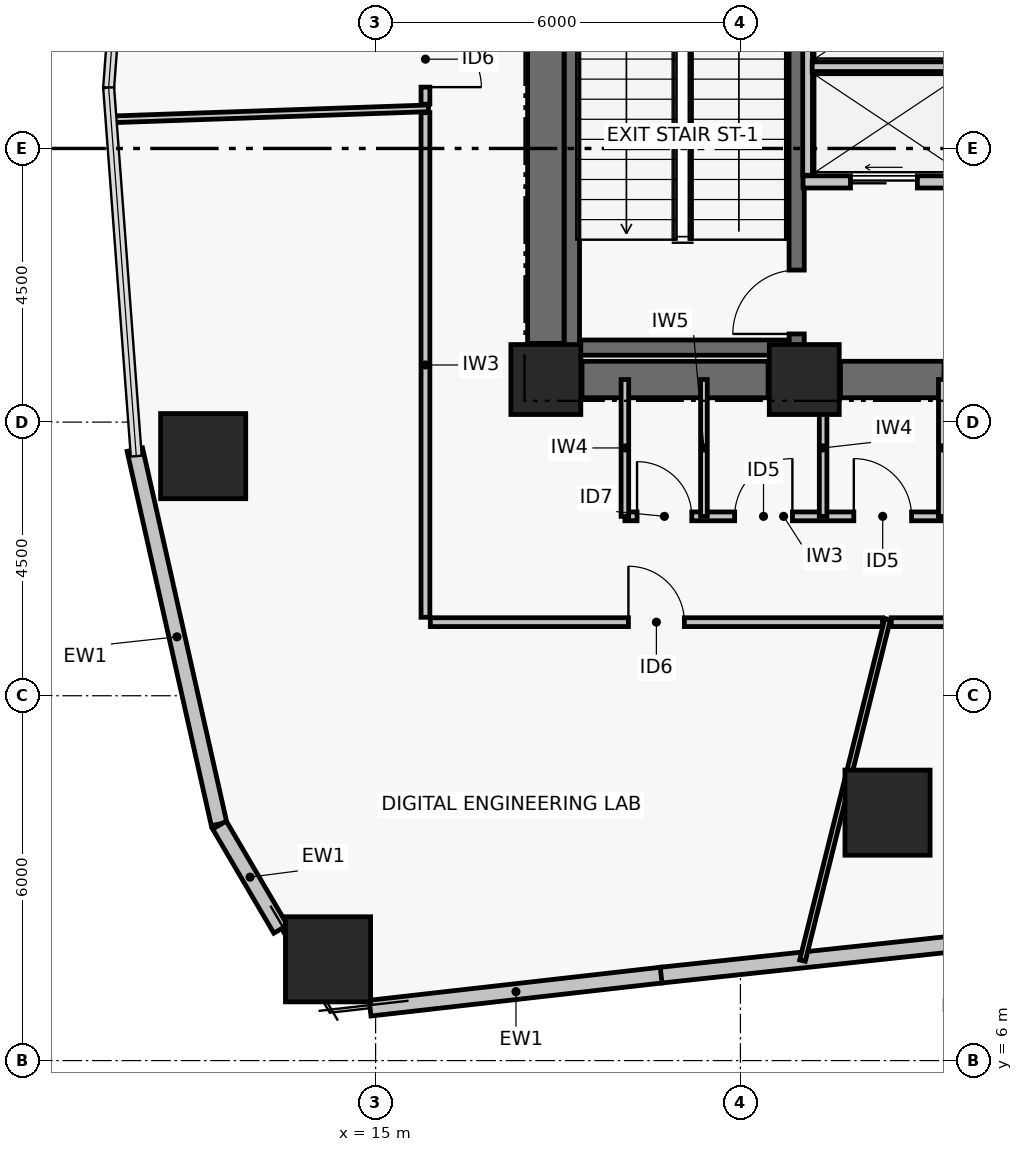
"""IFC4 building model, lengths in metres.
Left out: names, types, materials, properties, quantities, classifications, styles, units other than length and angle.
Written with IfcOpenShell. Run it as: python <this file> out.ifc"""

import sys

from ifc_helpers import new_model, si_unit, direction, frame, frame_2d, origin, origin_2d, place, context, subcontext, project, spatial, rectangle, hollow_rectangle, extrude, element, fill, save


model = new_model("IFC4")
c1 = context("Model", 3, precision=1e-05, world=origin(), true_north=direction((0.0, 1.0)))
c2 = subcontext(c1, "Body", "Model", "MODEL_VIEW")
j1 = project(units=[si_unit("LENGTHUNIT", "METRE"), si_unit("PLANEANGLEUNIT", "RADIAN")], contexts=[c1])
p1 = place(None, origin())
s1 = spatial("IfcSite", under=j1, at=p1, CompositionType="ELEMENT")
p2 = place(p1, origin())
s2 = spatial("IfcBuilding", under=s1, at=p2, CompositionType="ELEMENT")
p3 = place(p2, frame((0.0, 0.0, 57.36)))
s3 = spatial("IfcBuildingStorey", under=s2, at=p3, CompositionType="ELEMENT", Elevation=57.36)
for number, where, z_axis, x_axis in (
    (1, (17.8, 17.2, 0.0), (0.0, 0.0, 1.0), (1.0, 0.0, 0.0)),
    (2, (22.05, 17.2, 0.0), (0.0, 0.0, 1.0), (1.0, 0.0, 0.0)),
):
    element("IfcColumn", number, at=place(p3, frame(where, z_axis=z_axis, x_axis=x_axis)), inside=s3, PredefinedType="COLUMN", context=c2, shape_type="SweptSolid", body=[
        extrude(rectangle(XDim=1.15, YDim=1.15, at=origin_2d()), origin(), (0.0, 0.0, 1.0), 3.72),
    ])
p4 = place(p3, frame((18.395, 17.2, 0.0), z_axis=(0.0, 0.0, 1.0), x_axis=(1.0, 0.0, 0.0)))
e3 = element("IfcWall", 3, at=p4, inside=s3, PredefinedType="SHEAR", context=c2, shape_type="SweptSolid", body=[
    extrude(rectangle(XDim=3.06, YDim=0.6, at=frame_2d((1.53, 0.0))), origin(), (0.0, 0.0, 1.0), 3.47),
])
p5 = place(p3, frame((22.645, 17.2, 0.0), z_axis=(0.0, 0.0, 1.0), x_axis=(1.0, 0.0, 0.0)))
e4 = element("IfcWall", 4, at=p5, inside=s3, PredefinedType="SHEAR", context=c2, shape_type="SweptSolid", body=[
    extrude(rectangle(XDim=1.705, YDim=0.6, at=frame_2d((0.853, 0.0))), origin(), (0.0, 0.0, 1.0), 3.47),
])
p6 = place(p3, frame((17.8, 17.795, 0.0), z_axis=(0.0, 0.0, 1.0), x_axis=(0.0, 1.0, 0.0)))
e5 = element("IfcWall", 5, at=p6, inside=s3, PredefinedType="SHEAR", context=c2, shape_type="SweptSolid", body=[
    extrude(rectangle(XDim=8.41, YDim=0.6, at=frame_2d((4.205, 0.0))), origin(), (0.0, 0.0, 1.0), 3.47),
])
p7 = place(p3, frame((18.229, 17.6, 0.0), z_axis=(0.0, 0.0, 1.0), x_axis=(0.0, 1.0, 0.0)))
e6 = element("IfcWall", 6, at=p7, inside=s3, PredefinedType="SHEAR", context=c2, shape_type="SweptSolid", body=[
    extrude(rectangle(XDim=8.8, YDim=0.25, at=frame_2d((4.4, 0.0))), origin(), (0.0, 0.0, 1.0), 3.47),
])
p8 = place(p3, frame((21.925, 17.6, 0.0), z_axis=(0.0, 0.0, 1.0), x_axis=(0.0, 1.0, 0.0)))
e7 = element("IfcWall", 7, at=p8, inside=s3, PredefinedType="SHEAR", context=c2, shape_type="SweptSolid", body=[
    extrude(rectangle(XDim=8.8, YDim=0.25, at=frame_2d((4.4, 0.0))), origin(), (0.0, 0.0, 1.0), 3.47),
])
p9 = place(p8, frame((0.35, 0.0, 0.0)))
e8 = element("IfcOpeningElement", 8, at=p9, cuts=e7, PredefinedType="OPENING", context=c2, shape_type="SweptSolid", body=[
    extrude(rectangle(XDim=1.05, YDim=2.08, at=frame_2d((0.525, 1.04))), frame((0.0, 0.135, 0.0), z_axis=(0.0, -1.0, 0.0), x_axis=(1.0, 0.0, 0.0)), (0.0, 0.0, 1.0), 0.27),
])
p10 = place(p3, frame((18.354, 17.725, 0.0), z_axis=(0.0, 0.0, 1.0), x_axis=(1.0, 0.0, 0.0)))
e9 = element("IfcWall", 9, at=p10, inside=s3, PredefinedType="SHEAR", context=c2, shape_type="SweptSolid", body=[
    extrude(rectangle(XDim=3.446, YDim=0.25, at=frame_2d((1.723, 0.0))), origin(), (0.0, 0.0, 1.0), 3.47),
])
for number, where, z_axis, x_axis in (
    (10, (12.164, 15.94, 0.0), (0.0, 0.0, 1.0), (1.0, 0.0, 0.0)),
    (11, (14.218, 7.666, 0.0), (0.0, 0.0, 1.0), (1.0, 0.0, 0.0)),
    (12, (23.419, 10.077, 0.0), (0.0, 0.0, 1.0), (1.0, 0.0, 0.0)),
):
    element("IfcColumn", number, at=place(p3, frame(where, z_axis=z_axis, x_axis=x_axis)), inside=s3, PredefinedType="COLUMN", context=c2, shape_type="SweptSolid", body=[
        extrude(hollow_rectangle(XDim=1.4, YDim=1.4, WallThickness=0.055, at=origin_2d()), origin(), (0.0, 0.0, 1.0), 3.72),
    ])
p11 = place(p3, frame((12.426, 9.89, 0.0), z_axis=(0.0, 0.0, 1.0), x_axis=(-0.219505752381, 0.975611205692, 0.0)))
e13 = element("IfcWall", 13, at=p11, inside=s3, PredefinedType="PARTITIONING", context=c2, shape_type="SweptSolid", body=[
    extrude(rectangle(XDim=6.312, YDim=0.26, at=frame_2d((3.156, 0.0))), origin(), (0.0, 0.0, 1.0), 3.47),
])
p12 = place(p3, frame((13.438, 8.161, 0.0), z_axis=(0.0, 0.0, 1.0), x_axis=(-0.506772954594, 0.862079562739, 0.0)))
e14 = element("IfcWall", 14, at=p12, inside=s3, PredefinedType="PARTITIONING", context=c2, shape_type="SweptSolid", body=[
    extrude(rectangle(XDim=1.986, YDim=0.26, at=frame_2d((0.993, 0.0))), origin(), (0.0, 0.0, 1.0), 3.47),
])
p13 = place(p3, frame((19.708, 7.406, 0.0), z_axis=(0.0, 0.0, 1.0), x_axis=(-0.993630237788, -0.112689620435, 0.0)))
e15 = element("IfcWall", 15, at=p13, inside=s3, PredefinedType="PARTITIONING", context=c2, shape_type="SweptSolid", body=[
    extrude(rectangle(XDim=4.829, YDim=0.26, at=frame_2d((2.415, 0.0))), origin(), (0.0, 0.0, 1.0), 3.47),
])
p14 = place(p3, frame((29.398, 8.444, 0.0), z_axis=(0.0, 0.0, 1.0), x_axis=(-0.994319088673, -0.106440358419, 0.0)))
e16 = element("IfcWall", 16, at=p14, inside=s3, PredefinedType="PARTITIONING", context=c2, shape_type="SweptSolid", body=[
    extrude(rectangle(XDim=9.757, YDim=0.26, at=frame_2d((4.879, 0.0))), origin(), (0.0, 0.0, 1.0), 3.47),
])
p15 = place(p3, frame((22.03, 20.45, 0.0), z_axis=(0.0, 0.0, 1.0), x_axis=(1.0, 0.0, 0.0)))
e17 = element("IfcWall", 17, at=p15, inside=s3, PredefinedType="PARTITIONING", context=c2, shape_type="SweptSolid", body=[
    extrude(rectangle(XDim=2.8, YDim=0.2, at=frame_2d((1.4, 0.0))), origin(), (0.0, 0.0, 1.0), 3.47),
])
p16 = place(p15, frame((0.78, 0.0, 0.0)))
e18 = element("IfcOpeningElement", 18, at=p16, cuts=e17, PredefinedType="OPENING", context=c2, shape_type="SweptSolid", body=[
    extrude(rectangle(XDim=1.1, YDim=2.08, at=frame_2d((0.55, 1.04))), frame((0.0, 0.11, 0.0), z_axis=(0.0, -1.0, 0.0), x_axis=(1.0, 0.0, 0.0)), (0.0, 0.0, 1.0), 0.22),
])
p17 = place(p3, frame((22.105, 20.56, 0.0), z_axis=(0.0, 0.0, 1.0), x_axis=(0.0, 1.0, 0.0)))
e19 = element("IfcWall", 19, at=p17, inside=s3, PredefinedType="PARTITIONING", context=c2, shape_type="SweptSolid", body=[
    extrude(rectangle(XDim=5.45, YDim=0.16, at=frame_2d((2.725, 0.0))), origin(), (0.0, 0.0, 1.0), 3.47),
])
p18 = place(p3, frame((22.18, 22.345, 0.0), z_axis=(0.0, 0.0, 1.0), x_axis=(1.0, 0.0, 0.0)))
e20 = element("IfcWall", 20, at=p18, inside=s3, PredefinedType="PARTITIONING", context=c2, shape_type="SweptSolid", body=[
    extrude(rectangle(XDim=2.65, YDim=0.16, at=frame_2d((1.325, 0.0))), origin(), (0.0, 0.0, 1.0), 3.47),
])
p19 = place(p3, frame((19.1, 14.95, 0.0), z_axis=(0.0, 0.0, 1.0), x_axis=(1.0, 0.0, 0.0)))
e21 = element("IfcWall", 21, at=p19, inside=s3, PredefinedType="PARTITIONING", context=c2, shape_type="SweptSolid", body=[
    extrude(rectangle(XDim=5.22, YDim=0.145, at=frame_2d((2.61, 0.0))), origin(), (0.0, 0.0, 1.0), 2.6),
])
p20 = place(p19, frame((0.2, 0.0, 0.0)))
e22 = element("IfcOpeningElement", 22, at=p20, cuts=e21, PredefinedType="OPENING", context=c2, shape_type="SweptSolid", body=[
    extrude(rectangle(XDim=0.9, YDim=2.02, at=frame_2d((0.45, 1.01))), frame((0.0, 0.083, 0.0), z_axis=(0.0, -1.0, 0.0), x_axis=(1.0, 0.0, 0.0)), (0.0, 0.0, 1.0), 0.165),
])
p21 = place(p19, frame((1.805, 0.0, 0.0)))
e23 = element("IfcOpeningElement", 23, at=p21, cuts=e21, PredefinedType="OPENING", context=c2, shape_type="SweptSolid", body=[
    extrude(rectangle(XDim=0.95, YDim=2.06, at=frame_2d((0.475, 1.03))), frame((0.0, 0.083, 0.0), z_axis=(0.0, -1.0, 0.0), x_axis=(1.0, 0.0, 0.0)), (0.0, 0.0, 1.0), 0.165),
])
p22 = place(p19, frame((3.765, 0.0, 0.0)))
e24 = element("IfcOpeningElement", 24, at=p22, cuts=e21, PredefinedType="OPENING", context=c2, shape_type="SweptSolid", body=[
    extrude(rectangle(XDim=0.95, YDim=2.06, at=frame_2d((0.475, 1.03))), frame((0.0, 0.083, 0.0), z_axis=(0.0, -1.0, 0.0), x_axis=(1.0, 0.0, 0.0)), (0.0, 0.0, 1.0), 0.165),
])
p23 = place(p3, frame((19.1, 14.95, 0.0), z_axis=(0.0, 0.0, 1.0), x_axis=(0.0, 1.0, 0.0)))
e25 = element("IfcWall", 25, at=p23, inside=s3, PredefinedType="PARTITIONING", context=c2, shape_type="SweptSolid", body=[
    extrude(rectangle(XDim=2.25, YDim=0.125, at=frame_2d((1.125, 0.0))), origin(), (0.0, 0.0, 1.0), 2.6),
])
p24 = place(p3, frame((20.4, 14.95, 0.0), z_axis=(0.0, 0.0, 1.0), x_axis=(0.0, 1.0, 0.0)))
e26 = element("IfcWall", 26, at=p24, inside=s3, PredefinedType="PARTITIONING", context=c2, shape_type="SweptSolid", body=[
    extrude(rectangle(XDim=2.25, YDim=0.11, at=frame_2d((1.125, 0.0))), origin(), (0.0, 0.0, 1.0), 2.6),
])
for number, where, z_axis, x_axis in (
    (27, (22.36, 14.95, 0.0), (0.0, 0.0, 1.0), (0.0, 1.0, 0.0)),
    (28, (24.32, 14.95, 0.0), (0.0, 0.0, 1.0), (0.0, 1.0, 0.0)),
):
    element("IfcWall", number, at=place(p3, frame(where, z_axis=z_axis, x_axis=x_axis)), inside=s3, PredefinedType="PARTITIONING", context=c2, shape_type="SweptSolid", body=[
        extrude(rectangle(XDim=2.25, YDim=0.125, at=frame_2d((1.125, 0.0))), origin(), (0.0, 0.0, 1.0), 2.6),
    ])
p25 = place(p3, frame((15.82, 21.588, 0.0), z_axis=(0.0, 0.0, 1.0), x_axis=(0.0, -1.0, 0.0)))
e29 = element("IfcWall", 29, at=p25, inside=s3, PredefinedType="PARTITIONING", context=c2, shape_type="SweptSolid", body=[
    extrude(rectangle(XDim=8.298, YDim=0.145, at=frame_2d((4.149, 0.0))), origin(), (0.0, 0.0, 1.0), 2.6),
])
p26 = place(p3, frame((15.9, 13.21, 0.0), z_axis=(0.0, 0.0, 1.0), x_axis=(1.0, 0.0, 0.0)))
e30 = element("IfcWall", 30, at=p26, inside=s3, PredefinedType="PARTITIONING", context=c2, shape_type="SweptSolid", body=[
    extrude(rectangle(XDim=7.436, YDim=0.145, at=frame_2d((3.718, 0.0))), origin(), (0.0, 0.0, 1.0), 2.6),
])
p27 = place(p26, frame((3.258, 0.0, 0.0)))
e31 = element("IfcOpeningElement", 31, at=p27, cuts=e30, PredefinedType="OPENING", context=c2, shape_type="SweptSolid", body=[
    extrude(rectangle(XDim=0.92, YDim=2.05, at=frame_2d((0.46, 1.025))), frame((0.0, 0.083, 0.0), z_axis=(0.0, -1.0, 0.0), x_axis=(1.0, 0.0, 0.0)), (0.0, 0.0, 1.0), 0.165),
])
p28 = place(p3, frame((23.48, 13.21, 0.0), z_axis=(0.0, 0.0, 1.0), x_axis=(1.0, 0.0, 0.0)))
e32 = element("IfcWall", 32, at=p28, inside=s3, PredefinedType="PARTITIONING", context=c2, shape_type="SweptSolid", body=[
    extrude(rectangle(XDim=9.32, YDim=0.145, at=frame_2d((4.66, 0.0))), origin(), (0.0, 0.0, 1.0), 2.85),
])
p29 = place(p28, frame((7.113, 0.0, 0.0)))
e33 = element("IfcOpeningElement", 33, at=p29, cuts=e32, PredefinedType="OPENING", context=c2, shape_type="SweptSolid", body=[
    extrude(rectangle(XDim=0.95, YDim=2.06, at=frame_2d((0.475, 1.03))), frame((0.0, 0.083, 0.0), z_axis=(0.0, -1.0, 0.0), x_axis=(1.0, 0.0, 0.0)), (0.0, 0.0, 1.0), 0.165),
])
p30 = place(p3, frame((15.82, 28.7, 0.0), z_axis=(0.0, 0.0, 1.0), x_axis=(0.0, -1.0, 0.0)))
e34 = element("IfcWall", 34, at=p30, inside=s3, PredefinedType="PARTITIONING", context=c2, shape_type="SweptSolid", body=[
    extrude(rectangle(XDim=6.971, YDim=0.145, at=frame_2d((3.486, 0.0))), origin(), (0.0, 0.0, 1.0), 2.6),
])
p31 = place(p30, frame((5.771, 0.0, 0.0)))
e35 = element("IfcOpeningElement", 35, at=p31, cuts=e34, PredefinedType="OPENING", context=c2, shape_type="SweptSolid", body=[
    extrude(rectangle(XDim=0.92, YDim=2.05, at=frame_2d((0.46, 1.025))), frame((0.0, 0.083, 0.0), z_axis=(0.0, -1.0, 0.0), x_axis=(1.0, 0.0, 0.0)), (0.0, 0.0, 1.0), 0.165),
])
p32 = place(p3, frame((15.87, 21.66, 0.0), z_axis=(0.0, 0.0, 1.0), x_axis=(-0.999391229301, -0.034887974962, 0.0)))
e36 = element("IfcWall", 36, at=p32, inside=s3, PredefinedType="PARTITIONING", context=c2, shape_type="SweptSolid", body=[
    extrude(rectangle(XDim=5.234, YDim=0.11, at=frame_2d((2.617, 0.0))), origin(), (0.0, 0.0, 1.0), 2.85),
])
p33 = place(p3, frame((23.421, 13.26, 0.0), z_axis=(0.0, 0.0, 1.0), x_axis=(-0.241950009825, -0.97028871618, 0.0)))
e37 = element("IfcWall", 37, at=p33, inside=s3, PredefinedType="PARTITIONING", context=c2, shape_type="SweptSolid", body=[
    extrude(rectangle(XDim=5.788, YDim=0.095, at=frame_2d((2.894, 0.0))), origin(), (0.0, 0.0, 1.0), 2.6),
])
p34 = place(p9, origin())
e38 = element("IfcDoor", 38, at=p34, inside=s3, OperationType="SINGLE_SWING_LEFT", PredefinedType="DOOR", context=c2, shape_type="SweptSolid", body=[
    extrude(rectangle(XDim=1.05, YDim=2.08, at=frame_2d((0.525, 1.04))), frame((0.0, 0.025, 0.0), z_axis=(0.0, -1.0, 0.0), x_axis=(1.0, 0.0, 0.0)), (0.0, 0.0, 1.0), 0.05),
])
fill(e8, e38)
p35 = place(p16, origin())
e39 = element("IfcDoor", 39, at=p35, inside=s3, OperationType="DOUBLE_DOOR_SLIDING", PredefinedType="DOOR", context=c2, shape_type="SweptSolid", body=[
    extrude(rectangle(XDim=1.1, YDim=2.08, at=frame_2d((0.55, 1.04))), frame((0.0, 0.025, 0.0), z_axis=(0.0, -1.0, 0.0), x_axis=(1.0, 0.0, 0.0)), (0.0, 0.0, 1.0), 0.05),
])
fill(e18, e39)
p36 = place(p20, origin())
e40 = element("IfcDoor", 40, at=p36, inside=s3, OperationType="SINGLE_SWING_LEFT", PredefinedType="DOOR", context=c2, shape_type="SweptSolid", body=[
    extrude(rectangle(XDim=0.9, YDim=2.02, at=frame_2d((0.45, 1.01))), frame((0.0, 0.025, 0.0), z_axis=(0.0, -1.0, 0.0), x_axis=(1.0, 0.0, 0.0)), (0.0, 0.0, 1.0), 0.05),
])
fill(e22, e40)
p37 = place(p21, origin())
e41 = element("IfcDoor", 41, at=p37, inside=s3, OperationType="SINGLE_SWING_RIGHT", PredefinedType="DOOR", context=c2, shape_type="SweptSolid", body=[
    extrude(rectangle(XDim=0.95, YDim=2.06, at=frame_2d((0.475, 1.03))), frame((0.0, 0.025, 0.0), z_axis=(0.0, -1.0, 0.0), x_axis=(1.0, 0.0, 0.0)), (0.0, 0.0, 1.0), 0.05),
])
fill(e23, e41)
p38 = place(p22, origin())
e42 = element("IfcDoor", 42, at=p38, inside=s3, OperationType="SINGLE_SWING_LEFT", PredefinedType="DOOR", context=c2, shape_type="SweptSolid", body=[
    extrude(rectangle(XDim=0.95, YDim=2.06, at=frame_2d((0.475, 1.03))), frame((0.0, 0.025, 0.0), z_axis=(0.0, -1.0, 0.0), x_axis=(1.0, 0.0, 0.0)), (0.0, 0.0, 1.0), 0.05),
])
fill(e24, e42)
p39 = place(p27, origin())
e43 = element("IfcDoor", 43, at=p39, inside=s3, OperationType="SINGLE_SWING_LEFT", PredefinedType="DOOR", context=c2, shape_type="SweptSolid", body=[
    extrude(rectangle(XDim=0.92, YDim=2.05, at=frame_2d((0.46, 1.025))), frame((0.0, 0.025, 0.0), z_axis=(0.0, -1.0, 0.0), x_axis=(1.0, 0.0, 0.0)), (0.0, 0.0, 1.0), 0.05),
])
fill(e31, e43)
p40 = place(p31, origin())
e44 = element("IfcDoor", 44, at=p40, inside=s3, OperationType="SINGLE_SWING_RIGHT", PredefinedType="DOOR", context=c2, shape_type="SweptSolid", body=[
    extrude(rectangle(XDim=0.92, YDim=2.05, at=frame_2d((0.46, 1.025))), frame((0.0, 0.025, 0.0), z_axis=(0.0, -1.0, 0.0), x_axis=(1.0, 0.0, 0.0)), (0.0, 0.0, 1.0), 0.05),
])
fill(e35, e44)
save(model, sys.argv[1])
